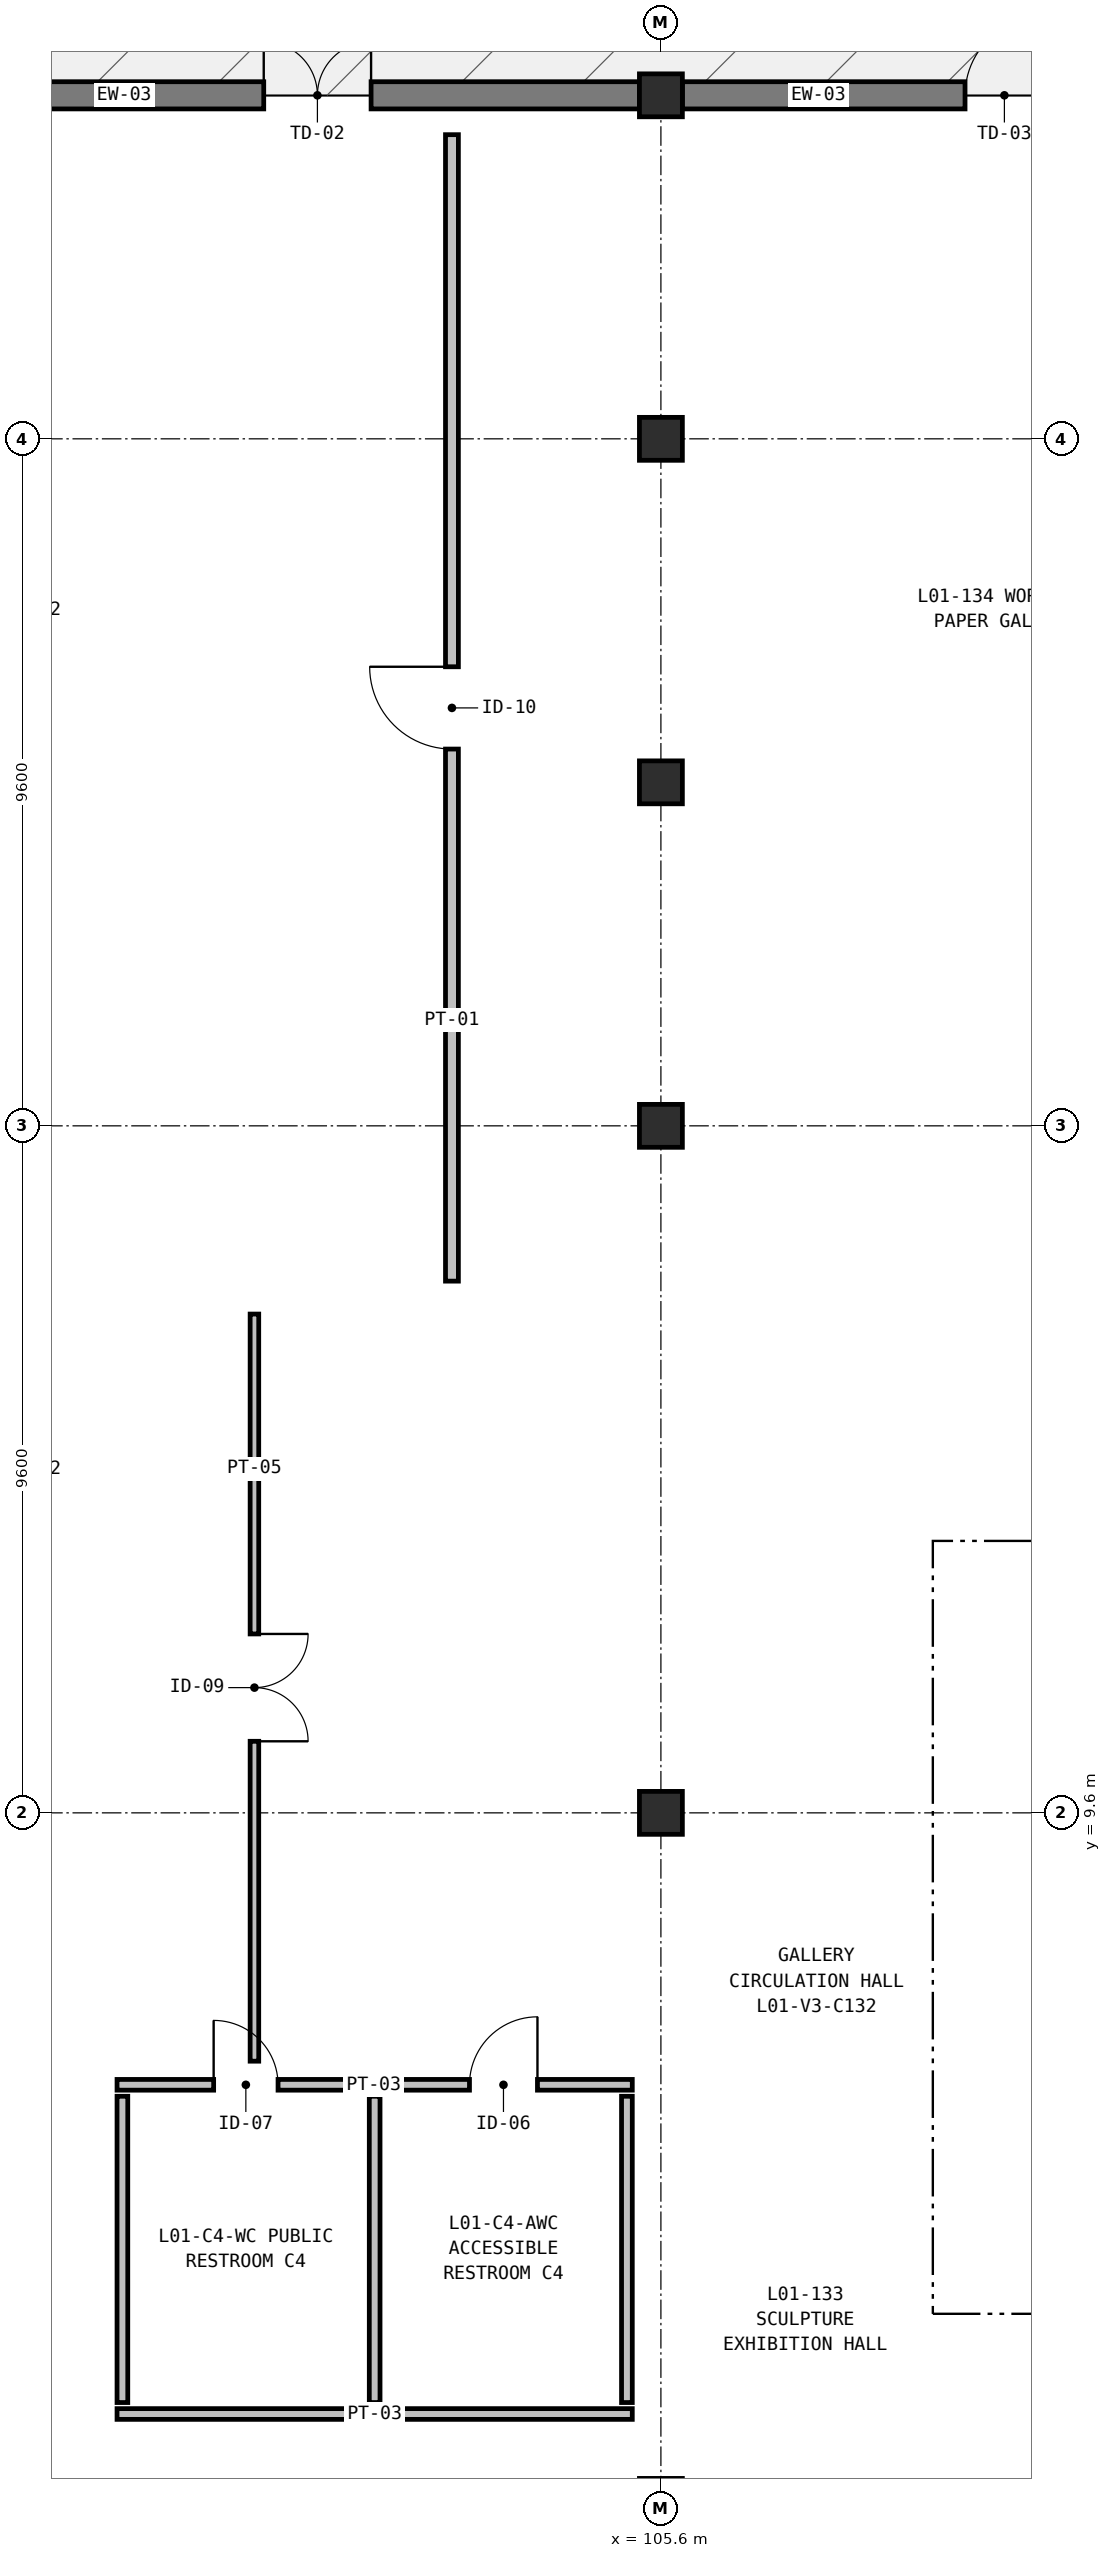
"""IFC4 building model, lengths in metres.
Left out: names, types, materials, properties, quantities, classifications, styles, units other than length and angle.
Written with IfcOpenShell. Run it as: python <this file> out.ifc"""

import sys

from ifc_helpers import new_model, si_unit, direction, frame, frame_2d, origin, origin_2d, place, context, subcontext, project, spatial, rectangle, extrude, element, fill, save


model = new_model("IFC4")
c1 = context("Model", 3, precision=1e-05, world=origin(), true_north=direction((0.0, 1.0)))
c2 = subcontext(c1, "Body", "Model", "MODEL_VIEW")
j1 = project(units=[si_unit("LENGTHUNIT", "METRE"), si_unit("PLANEANGLEUNIT", "RADIAN")], contexts=[c1])
p1 = place(None, origin())
s1 = spatial("IfcSite", under=j1, at=p1, CompositionType="ELEMENT")
p2 = place(p1, origin())
s2 = spatial("IfcBuilding", under=s1, at=p2, CompositionType="ELEMENT")
p3 = place(p2, frame((0.0, 0.0, 6.0)))
s3 = spatial("IfcBuildingStorey", under=s2, at=p3, CompositionType="ELEMENT", Elevation=6.0)
for number, where, z_axis, x_axis in (
    (1, (105.6, 9.6, 0.0), (0.0, 0.0, 1.0), (1.0, 0.0, 0.0)),
    (2, (105.6, 19.2, 0.0), (0.0, 0.0, 1.0), (1.0, 0.0, 0.0)),
    (3, (105.6, 24.0, 0.0), (0.0, 0.0, 1.0), (1.0, 0.0, 0.0)),
    (4, (105.6, 28.8, 0.0), (0.0, 0.0, 1.0), (1.0, 0.0, 0.0)),
    (5, (105.6, 33.6, 0.0), (0.0, 0.0, 1.0), (1.0, 0.0, 0.0)),
):
    element("IfcColumn", number, at=place(p3, frame(where, z_axis=z_axis, x_axis=x_axis)), inside=s3, PredefinedType="COLUMN", context=c2, shape_type="SweptSolid", body=[
        extrude(rectangle(XDim=0.6, YDim=0.6, at=origin_2d()), origin(), (0.0, 0.0, 1.0), 5.4),
    ])
p4 = place(p3, frame((96.3, 33.6, 0.0), z_axis=(0.0, 0.0, 1.0), x_axis=(1.0, 0.0, 0.0)))
e6 = element("IfcWall", 6, at=p4, inside=s3, PredefinedType="SOLIDWALL", context=c2, shape_type="SweptSolid", body=[
    extrude(rectangle(XDim=9.0, YDim=0.38, at=frame_2d((4.5, 0.0))), origin(), (0.0, 0.0, 1.0), 5.08),
])
p5 = place(p4, frame((3.75, 0.0, 0.0)))
e7 = element("IfcOpeningElement", 7, at=p5, cuts=e6, PredefinedType="OPENING", context=c2, shape_type="SweptSolid", body=[
    extrude(rectangle(XDim=1.5, YDim=2.25, at=frame_2d((0.75, 1.125))), frame((0.0, 0.2, 0.0), z_axis=(0.0, -1.0, 0.0), x_axis=(1.0, 0.0, 0.0)), (0.0, 0.0, 1.0), 0.4),
])
p6 = place(p3, frame((105.9, 33.6, 0.0), z_axis=(0.0, 0.0, 1.0), x_axis=(1.0, 0.0, 0.0)))
e8 = element("IfcWall", 8, at=p6, inside=s3, PredefinedType="SOLIDWALL", context=c2, shape_type="SweptSolid", body=[
    extrude(rectangle(XDim=9.0, YDim=0.38, at=frame_2d((4.5, 0.0))), origin(), (0.0, 0.0, 1.0), 5.08),
])
p7 = place(p6, frame((3.95, 0.0, 0.0)))
e9 = element("IfcOpeningElement", 9, at=p7, cuts=e8, PredefinedType="OPENING", context=c2, shape_type="SweptSolid", body=[
    extrude(rectangle(XDim=1.1, YDim=2.2, at=frame_2d((0.55, 1.1))), frame((0.0, 0.2, 0.0), z_axis=(0.0, -1.0, 0.0), x_axis=(1.0, 0.0, 0.0)), (0.0, 0.0, 1.0), 0.4),
])
p8 = place(p3, frame((98.0, 5.8, 0.0), z_axis=(0.0, 0.0, 1.0), x_axis=(1.0, 0.0, 0.0)))
e10 = element("IfcWall", 10, at=p8, inside=s3, PredefinedType="PARTITIONING", context=c2, shape_type="SweptSolid", body=[
    extrude(rectangle(XDim=7.2, YDim=0.15, at=frame_2d((3.6, 0.0))), origin(), (0.0, 0.0, 1.0), 5.08),
])
p9 = place(p8, frame((1.35, 0.0, 0.0)))
e11 = element("IfcOpeningElement", 11, at=p9, cuts=e10, PredefinedType="OPENING", context=c2, shape_type="SweptSolid", body=[
    extrude(rectangle(XDim=0.9, YDim=2.1, at=frame_2d((0.45, 1.05))), frame((0.0, 0.085, 0.0), z_axis=(0.0, -1.0, 0.0), x_axis=(1.0, 0.0, 0.0)), (0.0, 0.0, 1.0), 0.17),
])
p10 = place(p8, frame((4.925, 0.0, 0.0)))
e12 = element("IfcOpeningElement", 12, at=p10, cuts=e10, PredefinedType="OPENING", context=c2, shape_type="SweptSolid", body=[
    extrude(rectangle(XDim=0.95, YDim=2.15, at=frame_2d((0.475, 1.075))), frame((0.0, 0.085, 0.0), z_axis=(0.0, -1.0, 0.0), x_axis=(1.0, 0.0, 0.0)), (0.0, 0.0, 1.0), 0.17),
])
p11 = place(p3, frame((98.0, 1.2, 0.0), z_axis=(0.0, 0.0, 1.0), x_axis=(1.0, 0.0, 0.0)))
e13 = element("IfcWall", 13, at=p11, inside=s3, PredefinedType="PARTITIONING", context=c2, shape_type="SweptSolid", body=[
    extrude(rectangle(XDim=7.2, YDim=0.15, at=frame_2d((3.6, 0.0))), origin(), (0.0, 0.0, 1.0), 5.08),
])
for number, where, z_axis, x_axis in (
    (14, (98.075, 1.36, 0.0), (0.0, 0.0, 1.0), (0.0, 1.0, 0.0)),
    (15, (101.6, 1.36, 0.0), (0.0, 0.0, 1.0), (0.0, 1.0, 0.0)),
    (16, (105.125, 1.36, 0.0), (0.0, 0.0, 1.0), (0.0, 1.0, 0.0)),
):
    element("IfcWall", number, at=place(p3, frame(where, z_axis=z_axis, x_axis=x_axis)), inside=s3, PredefinedType="PARTITIONING", context=c2, shape_type="SweptSolid", body=[
        extrude(rectangle(XDim=4.28, YDim=0.15, at=frame_2d((2.14, 0.0))), origin(), (0.0, 0.0, 1.0), 4.455),
    ])
p12 = place(p3, frame((99.92, 16.57, 0.0), z_axis=(0.0, 0.0, 1.0), x_axis=(0.0, -1.0, 0.0)))
e17 = element("IfcWall", 17, at=p12, inside=s3, PredefinedType="PARTITIONING", context=c2, shape_type="SweptSolid", body=[
    extrude(rectangle(XDim=10.44, YDim=0.12, at=frame_2d((5.22, 0.0))), origin(), (0.0, 0.0, 1.0), 4.305),
])
p13 = place(p12, frame((4.47, 0.0, 0.0)))
e18 = element("IfcOpeningElement", 18, at=p13, cuts=e17, PredefinedType="OPENING", context=c2, shape_type="SweptSolid", body=[
    extrude(rectangle(XDim=1.5, YDim=2.3, at=frame_2d((0.75, 1.15))), frame((0.0, 0.07, 0.0), z_axis=(0.0, -1.0, 0.0), x_axis=(1.0, 0.0, 0.0)), (0.0, 0.0, 1.0), 0.14),
])
p14 = place(p3, frame((102.68, 17.03, 0.0), z_axis=(0.0, 0.0, 1.0), x_axis=(0.0, 1.0, 0.0)))
e19 = element("IfcWall", 19, at=p14, inside=s3, PredefinedType="PARTITIONING", context=c2, shape_type="SweptSolid", body=[
    extrude(rectangle(XDim=16.02, YDim=0.18, at=frame_2d((8.01, 0.0))), origin(), (0.0, 0.0, 1.0), 4.305),
])
p15 = place(p14, frame((7.435, 0.0, 0.0)))
e20 = element("IfcOpeningElement", 20, at=p15, cuts=e19, PredefinedType="OPENING", context=c2, shape_type="SweptSolid", body=[
    extrude(rectangle(XDim=1.15, YDim=2.2, at=frame_2d((0.575, 1.1))), frame((0.0, 0.1, 0.0), z_axis=(0.0, -1.0, 0.0), x_axis=(1.0, 0.0, 0.0)), (0.0, 0.0, 1.0), 0.2),
])
p16 = place(p5, origin())
e21 = element("IfcDoor", 21, at=p16, inside=s3, OperationType="DOUBLE_DOOR_SINGLE_SWING", PredefinedType="DOOR", context=c2, shape_type="SweptSolid", body=[
    extrude(rectangle(XDim=1.5, YDim=2.25, at=frame_2d((0.75, 1.125))), frame((0.0, 0.025, 0.0), z_axis=(0.0, -1.0, 0.0), x_axis=(1.0, 0.0, 0.0)), (0.0, 0.0, 1.0), 0.05),
])
fill(e7, e21)
p17 = place(p7, origin())
e22 = element("IfcDoor", 22, at=p17, inside=s3, OperationType="SINGLE_SWING_RIGHT", PredefinedType="DOOR", context=c2, shape_type="SweptSolid", body=[
    extrude(rectangle(XDim=1.1, YDim=2.2, at=frame_2d((0.55, 1.1))), frame((0.0, 0.025, 0.0), z_axis=(0.0, -1.0, 0.0), x_axis=(1.0, 0.0, 0.0)), (0.0, 0.0, 1.0), 0.05),
])
fill(e9, e22)
p18 = place(p9, origin())
e23 = element("IfcDoor", 23, at=p18, inside=s3, OperationType="SINGLE_SWING_LEFT", PredefinedType="DOOR", context=c2, shape_type="SweptSolid", body=[
    extrude(rectangle(XDim=0.9, YDim=2.1, at=frame_2d((0.45, 1.05))), frame((0.0, 0.025, 0.0), z_axis=(0.0, -1.0, 0.0), x_axis=(1.0, 0.0, 0.0)), (0.0, 0.0, 1.0), 0.05),
])
fill(e11, e23)
p19 = place(p10, origin())
e24 = element("IfcDoor", 24, at=p19, inside=s3, OperationType="SINGLE_SWING_RIGHT", PredefinedType="DOOR", context=c2, shape_type="SweptSolid", body=[
    extrude(rectangle(XDim=0.95, YDim=2.15, at=frame_2d((0.475, 1.075))), frame((0.0, 0.025, 0.0), z_axis=(0.0, -1.0, 0.0), x_axis=(1.0, 0.0, 0.0)), (0.0, 0.0, 1.0), 0.05),
])
fill(e12, e24)
p20 = place(p13, origin())
e25 = element("IfcDoor", 25, at=p20, inside=s3, OperationType="DOUBLE_DOOR_SINGLE_SWING", PredefinedType="DOOR", context=c2, shape_type="SweptSolid", body=[
    extrude(rectangle(XDim=1.5, YDim=2.3, at=frame_2d((0.75, 1.15))), frame((0.0, 0.025, 0.0), z_axis=(0.0, -1.0, 0.0), x_axis=(1.0, 0.0, 0.0)), (0.0, 0.0, 1.0), 0.05),
])
fill(e18, e25)
p21 = place(p15, origin())
e26 = element("IfcDoor", 26, at=p21, inside=s3, OperationType="SINGLE_SWING_RIGHT", PredefinedType="DOOR", context=c2, shape_type="SweptSolid", body=[
    extrude(rectangle(XDim=1.15, YDim=2.2, at=frame_2d((0.575, 1.1))), frame((0.0, 0.025, 0.0), z_axis=(0.0, -1.0, 0.0), x_axis=(1.0, 0.0, 0.0)), (0.0, 0.0, 1.0), 0.05),
])
fill(e20, e26)
save(model, sys.argv[1])
